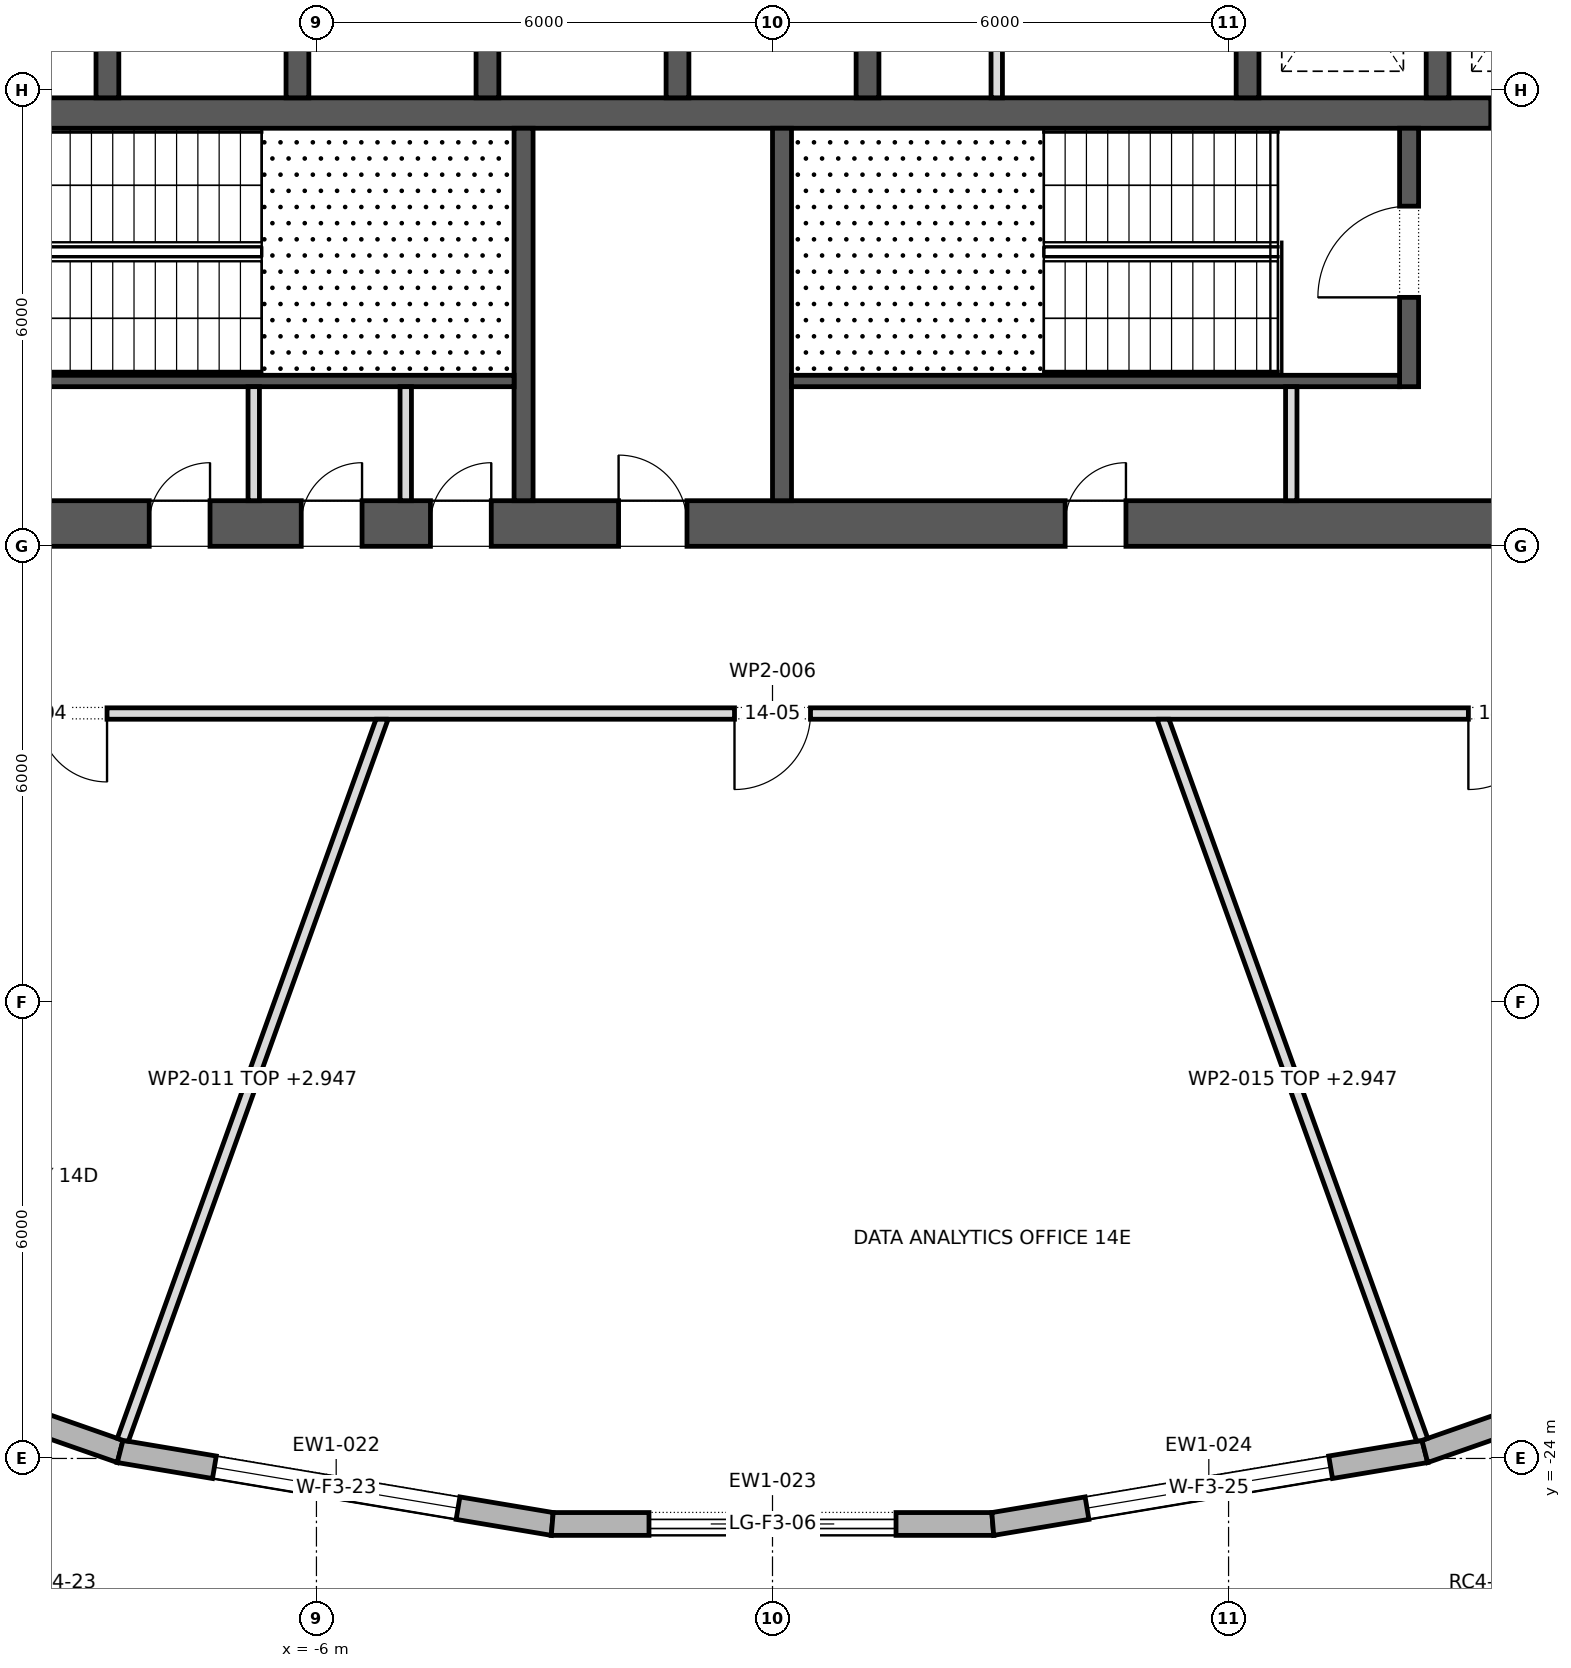
"""IFC4 building model, lengths in metres.
Left out: names, types, materials, properties, quantities, classifications, styles, units other than length and angle.
Written with IfcOpenShell. Run it as: python <this file> out.ifc"""

import sys

from ifc_helpers import new_model, si_unit, direction, frame, frame_2d, origin, place, context, subcontext, project, spatial, polyline, rectangle, outline, extrude, element, fill, save


model = new_model("IFC4")
c1 = context("Model", 3, precision=1e-05, world=origin(), true_north=direction((0.0, 1.0)))
c2 = subcontext(c1, "Body", "Model", "MODEL_VIEW")
j1 = project(units=[si_unit("LENGTHUNIT", "METRE"), si_unit("PLANEANGLEUNIT", "RADIAN")], contexts=[c1])
p1 = place(None, origin())
s1 = spatial("IfcSite", under=j1, at=p1, CompositionType="ELEMENT")
p2 = place(p1, origin())
s2 = spatial("IfcBuilding", under=s1, at=p2, CompositionType="ELEMENT")
p3 = place(p2, frame((0.0, 0.0, 202.9)))
s3 = spatial("IfcBuildingStorey", under=s2, at=p3, CompositionType="ELEMENT", Elevation=202.9)
p4 = place(p3, frame((-12.0, -11.7, 0.0), z_axis=(0.0, 0.0, 1.0), x_axis=(1.0, 0.0, 0.0)))
e1 = element("IfcWall", 1, at=p4, inside=s3, PredefinedType="SHEAR", context=c2, shape_type="SweptSolid", body=[
    extrude(rectangle(XDim=24.0, YDim=0.6, at=frame_2d((12.0, 0.0))), origin(), (0.0, 0.0, 1.0), 4.0),
])
p5 = place(p4, frame((9.975, 0.0, 0.0)))
e2 = element("IfcOpeningElement", 2, at=p5, cuts=e1, PredefinedType="OPENING", context=c2, shape_type="SweptSolid", body=[
    extrude(rectangle(XDim=0.9, YDim=2.1, at=frame_2d((0.45, 1.05))), frame((0.0, 0.312, 0.0), z_axis=(0.0, -1.0, 0.0), x_axis=(1.0, 0.0, 0.0)), (0.0, 0.0, 1.0), 0.624),
])
p6 = place(p4, frame((3.8, 0.0, 0.0)))
e3 = element("IfcOpeningElement", 3, at=p6, cuts=e1, PredefinedType="OPENING", context=c2, shape_type="SweptSolid", body=[
    extrude(rectangle(XDim=0.8, YDim=2.1, at=frame_2d((0.4, 1.05))), frame((0.0, 0.312, 0.0), z_axis=(0.0, -1.0, 0.0), x_axis=(1.0, 0.0, 0.0)), (0.0, 0.0, 1.0), 0.624),
])
p7 = place(p4, frame((5.8, 0.0, 0.0)))
e4 = element("IfcOpeningElement", 4, at=p7, cuts=e1, PredefinedType="OPENING", context=c2, shape_type="SweptSolid", body=[
    extrude(rectangle(XDim=0.8, YDim=2.1, at=frame_2d((0.4, 1.05))), frame((0.0, 0.312, 0.0), z_axis=(0.0, -1.0, 0.0), x_axis=(1.0, 0.0, 0.0)), (0.0, 0.0, 1.0), 0.624),
])
p8 = place(p4, frame((7.5, 0.0, 0.0)))
e5 = element("IfcOpeningElement", 5, at=p8, cuts=e1, PredefinedType="OPENING", context=c2, shape_type="SweptSolid", body=[
    extrude(rectangle(XDim=0.8, YDim=2.1, at=frame_2d((0.4, 1.05))), frame((0.0, 0.312, 0.0), z_axis=(0.0, -1.0, 0.0), x_axis=(1.0, 0.0, 0.0)), (0.0, 0.0, 1.0), 0.624),
])
p9 = place(p4, frame((15.85, 0.0, 0.0)))
e6 = element("IfcOpeningElement", 6, at=p9, cuts=e1, PredefinedType="OPENING", context=c2, shape_type="SweptSolid", body=[
    extrude(rectangle(XDim=0.8, YDim=2.1, at=frame_2d((0.4, 1.05))), frame((0.0, 0.312, 0.0), z_axis=(0.0, -1.0, 0.0), x_axis=(1.0, 0.0, 0.0)), (0.0, 0.0, 1.0), 0.624),
])
p10 = place(p3, frame((-11.4, -6.3, 0.0), z_axis=(0.0, 0.0, 1.0), x_axis=(1.0, 0.0, 0.0)))
e7 = element("IfcWall", 7, at=p10, inside=s3, PredefinedType="SHEAR", context=c2, shape_type="SweptSolid", body=[
    extrude(rectangle(XDim=22.8, YDim=0.4, at=frame_2d((11.4, 0.0))), origin(), (0.0, 0.0, 1.0), 4.0),
])
p11 = place(p10, frame((20.85, 0.0, 0.0)))
e8 = element("IfcOpeningElement", 8, at=p11, cuts=e7, PredefinedType="OPENING", context=c2, shape_type="SweptSolid", body=[
    extrude(rectangle(XDim=1.1, YDim=2.1, at=frame_2d((0.55, 1.05))), frame((0.0, 0.212, 0.0), z_axis=(0.0, -1.0, 0.0), x_axis=(1.0, 0.0, 0.0)), (0.0, 0.0, 1.0), 0.424),
])
for number, where, z_axis, x_axis in (
    (9, (-8.75, -6.1, 0.0), (0.0, 0.0, 1.0), (0.0, 1.0, 0.0)),
    (10, (-6.25, -6.1, 0.0), (0.0, 0.0, 1.0), (0.0, 1.0, 0.0)),
    (11, (-3.75, -6.1, 0.0), (0.0, 0.0, 1.0), (0.0, 1.0, 0.0)),
    (12, (-1.25, -6.1, 0.0), (0.0, 0.0, 1.0), (0.0, 1.0, 0.0)),
    (13, (1.25, -6.1, 0.0), (0.0, 0.0, 1.0), (0.0, 1.0, 0.0)),
    (14, (6.25, -6.1, 0.0), (0.0, 0.0, 1.0), (0.0, 1.0, 0.0)),
    (15, (8.75, -6.1, 0.0), (0.0, 0.0, 1.0), (0.0, 1.0, 0.0)),
):
    element("IfcWall", number, at=place(p3, frame(where, z_axis=z_axis, x_axis=x_axis)), inside=s3, PredefinedType="SHEAR", context=c2, shape_type="SweptSolid", body=[
        extrude(rectangle(XDim=2.9, YDim=0.3, at=frame_2d((1.45, 0.0))), origin(), (0.0, 0.0, 1.0), 4.0),
    ])
p12 = place(p3, frame((-13.938, -22.037, 0.0), z_axis=(0.0, 0.0, 1.0), x_axis=(0.944023272224, -0.329878858824, 0.0)))
e16 = element("IfcWall", 16, at=p12, inside=s3, PredefinedType="STANDARD", context=c2, shape_type="SweptSolid", body=[
    extrude(outline(polyline([(-0.013, -0.15), (5.686, -0.15), (5.661, 0.15), (0.013, 0.15), (-0.013, -0.15)])), origin(), (0.0, 0.0, 1.0), 3.7),
])
p13 = place(p12, frame((1.212, 0.0, 0.6)))
e17 = element("IfcOpeningElement", 17, at=p13, cuts=e16, PredefinedType="OPENING", context=c2, shape_type="SweptSolid", body=[
    extrude(rectangle(XDim=3.25, YDim=2.65, at=frame_2d((1.625, 1.325))), frame((0.0, 0.162, 0.0), z_axis=(0.0, -1.0, 0.0), x_axis=(1.0, 0.0, 0.0)), (0.0, 0.0, 1.0), 0.324),
])
p14 = place(p3, frame((-8.583, -23.908, 0.0), z_axis=(0.0, 0.0, 1.0), x_axis=(0.98622052717, -0.165436005116, 0.0)))
e18 = element("IfcWall", 18, at=p14, inside=s3, PredefinedType="STANDARD", context=c2, shape_type="SweptSolid", body=[
    extrude(outline(polyline([(-0.013, -0.15), (5.777, -0.15), (5.752, 0.15), (0.013, 0.15), (-0.013, -0.15)])), origin(), (0.0, 0.0, 1.0), 3.7),
])
p15 = place(p14, frame((1.257, 0.0, 0.6)))
e19 = element("IfcOpeningElement", 19, at=p15, cuts=e18, PredefinedType="OPENING", context=c2, shape_type="SweptSolid", body=[
    extrude(rectangle(XDim=3.25, YDim=2.65, at=frame_2d((1.625, 1.325))), frame((0.0, 0.162, 0.0), z_axis=(0.0, -1.0, 0.0), x_axis=(1.0, 0.0, 0.0)), (0.0, 0.0, 1.0), 0.324),
])
p16 = place(p3, frame((-2.898, -24.862, 0.0), z_axis=(0.0, 0.0, 1.0), x_axis=(1.0, 0.0, 0.0)))
e20 = element("IfcWall", 20, at=p16, inside=s3, PredefinedType="STANDARD", context=c2, shape_type="SweptSolid", body=[
    extrude(outline(polyline([(-0.012, -0.15), (5.808, -0.15), (5.783, 0.15), (0.012, 0.15), (-0.012, -0.15)])), origin(), (0.0, 0.0, 1.0), 3.7),
])
p17 = place(p16, frame((1.273, 0.0, 0.0)))
e21 = element("IfcOpeningElement", 21, at=p17, cuts=e20, PredefinedType="OPENING", context=c2, shape_type="SweptSolid", body=[
    extrude(rectangle(XDim=3.25, YDim=3.25, at=frame_2d((1.625, 1.625))), frame((0.0, 0.162, 0.0), z_axis=(0.0, -1.0, 0.0), x_axis=(1.0, 0.0, 0.0)), (0.0, 0.0, 1.0), 0.324),
])
p18 = place(p3, frame((2.898, -24.862, 0.0), z_axis=(0.0, 0.0, 1.0), x_axis=(0.98622052717, 0.165436005116, 0.0)))
e22 = element("IfcWall", 22, at=p18, inside=s3, PredefinedType="STANDARD", context=c2, shape_type="SweptSolid", body=[
    extrude(outline(polyline([(-0.012, -0.15), (5.777, -0.15), (5.751, 0.15), (0.012, 0.15), (-0.012, -0.15)])), origin(), (0.0, 0.0, 1.0), 3.7),
])
p19 = place(p18, frame((1.257, 0.0, 0.6)))
e23 = element("IfcOpeningElement", 23, at=p19, cuts=e22, PredefinedType="OPENING", context=c2, shape_type="SweptSolid", body=[
    extrude(rectangle(XDim=3.25, YDim=2.65, at=frame_2d((1.625, 1.325))), frame((0.0, 0.162, 0.0), z_axis=(0.0, -1.0, 0.0), x_axis=(1.0, 0.0, 0.0)), (0.0, 0.0, 1.0), 0.324),
])
p20 = place(p3, frame((8.583, -23.908, 0.0), z_axis=(0.0, 0.0, 1.0), x_axis=(0.944023272224, 0.329878858824, 0.0)))
e24 = element("IfcWall", 24, at=p20, inside=s3, PredefinedType="STANDARD", context=c2, shape_type="SweptSolid", body=[
    extrude(outline(polyline([(-0.013, -0.15), (5.687, -0.15), (5.66, 0.15), (0.013, 0.15), (-0.013, -0.15)])), origin(), (0.0, 0.0, 1.0), 3.7),
])
p21 = place(p20, frame((1.212, 0.0, 0.6)))
e25 = element("IfcOpeningElement", 25, at=p21, cuts=e24, PredefinedType="OPENING", context=c2, shape_type="SweptSolid", body=[
    extrude(rectangle(XDim=3.25, YDim=2.65, at=frame_2d((1.625, 1.325))), frame((0.0, 0.162, 0.0), z_axis=(0.0, -1.0, 0.0), x_axis=(1.0, 0.0, 0.0)), (0.0, 0.0, 1.0), 0.324),
])
for number, where, z_axis, x_axis in (
    (26, (-3.275, -11.4, 0.0), (0.0, 0.0, 1.0), (0.0, 1.0, 0.0)),
    (27, (0.125, -11.4, 0.0), (0.0, 0.0, 1.0), (0.0, 1.0, 0.0)),
):
    element("IfcWall", number, at=place(p3, frame(where, z_axis=z_axis, x_axis=x_axis)), inside=s3, PredefinedType="SHEAR", context=c2, shape_type="SweptSolid", body=[
        extrude(rectangle(XDim=4.9, YDim=0.25, at=frame_2d((2.45, 0.0))), origin(), (0.0, 0.0, 1.0), 3.7),
    ])
p22 = place(p3, frame((8.375, -9.9, 0.0), z_axis=(0.0, 0.0, 1.0), x_axis=(0.0, 1.0, 0.0)))
e28 = element("IfcWall", 28, at=p22, inside=s3, PredefinedType="SHEAR", context=c2, shape_type="SweptSolid", body=[
    extrude(rectangle(XDim=3.4, YDim=0.25, at=frame_2d((1.7, 0.0))), origin(), (0.0, 0.0, 1.0), 3.7),
])
p23 = place(p22, frame((1.175, 0.0, 0.0)))
e29 = element("IfcOpeningElement", 29, at=p23, cuts=e28, PredefinedType="OPENING", context=c2, shape_type="SweptSolid", body=[
    extrude(rectangle(XDim=1.2, YDim=2.1, at=frame_2d((0.6, 1.05))), frame((0.0, 0.137, 0.0), z_axis=(0.0, -1.0, 0.0), x_axis=(1.0, 0.0, 0.0)), (0.0, 0.0, 1.0), 0.274),
])
for number, where, z_axis, x_axis in (
    (30, (-11.4, -9.825, 0.0), (0.0, 0.0, 1.0), (1.0, 0.0, 0.0)),
    (31, (0.25, -9.825, 0.0), (0.0, 0.0, 1.0), (1.0, 0.0, 0.0)),
):
    element("IfcWall", number, at=place(p3, frame(where, z_axis=z_axis, x_axis=x_axis)), inside=s3, PredefinedType="SHEAR", context=c2, shape_type="SweptSolid", body=[
        extrude(rectangle(XDim=8.0, YDim=0.15, at=frame_2d((4.0, 0.0))), origin(), (0.0, 0.0, 1.0), 3.7),
    ])
for number, where, z_axis, x_axis in (
    (32, (-6.825, -11.4, 0.0), (0.0, 0.0, 1.0), (0.0, 1.0, 0.0)),
    (33, (-4.825, -11.4, 0.0), (0.0, 0.0, 1.0), (0.0, 1.0, 0.0)),
    (34, (6.825, -11.4, 0.0), (0.0, 0.0, 1.0), (0.0, 1.0, 0.0)),
):
    element("IfcWall", number, at=place(p3, frame(where, z_axis=z_axis, x_axis=x_axis)), inside=s3, PredefinedType="PARTITIONING", context=c2, shape_type="SweptSolid", body=[
        extrude(rectangle(XDim=1.5, YDim=0.15, at=frame_2d((0.75, 0.0))), origin(), (0.0, 0.0, 1.0), 3.7),
    ])
p24 = place(p3, frame((2.95, -6.1, 0.0), z_axis=(0.0, 0.0, 1.0), x_axis=(0.0, 1.0, 0.0)))
e35 = element("IfcWall", 35, at=p24, inside=s3, PredefinedType="PARTITIONING", context=c2, shape_type="SweptSolid", body=[
    extrude(rectangle(XDim=2.9, YDim=0.15, at=frame_2d((1.45, 0.0))), origin(), (0.0, 0.0, 1.0), 3.7),
])
p25 = place(p3, frame((-14.275, -14.2, 0.0), z_axis=(0.0, 0.0, 1.0), x_axis=(1.0, 0.0, 0.0)))
e36 = element("IfcWall", 36, at=p25, inside=s3, PredefinedType="PARTITIONING", context=c2, shape_type="SweptSolid", body=[
    extrude(outline(polyline([(28.55, -0.075), (28.55, -0.075), (28.4, 0.075), (26.517, 0.075), (24.633, 0.075), (22.75, 0.075), (20.866, 0.075), (18.983, 0.075), (17.1, 0.075), (15.217, 0.075), (13.333, 0.075), (11.45, 0.075), (9.567, 0.075), (7.683, 0.075), (5.8, 0.075), (3.917, 0.075), (2.033, 0.075), (0.15, 0.075), (0.0, -0.075), (1.903, -0.075), (3.807, -0.075), (5.71, -0.075), (7.613, -0.075), (9.517, -0.075), (11.42, -0.075), (13.323, -0.075), (15.227, -0.075), (17.13, -0.075), (19.033, -0.075), (20.937, -0.075), (22.84, -0.075), (24.743, -0.075), (26.646, -0.075), (28.55, -0.075)])), origin(), (0.0, 0.0, 1.0), 3.7),
])
p26 = place(p25, frame((3.72, 0.0, 0.0)))
e37 = element("IfcOpeningElement", 37, at=p26, cuts=e36, PredefinedType="OPENING", context=c2, shape_type="SweptSolid", body=[
    extrude(rectangle(XDim=1.8, YDim=2.1, at=frame_2d((0.9, 1.05))), frame((0.0, 0.087, 0.0), z_axis=(0.0, -1.0, 0.0), x_axis=(1.0, 0.0, 0.0)), (0.0, 0.0, 1.0), 0.174),
])
p27 = place(p25, frame((13.775, 0.0, 0.0)))
e38 = element("IfcOpeningElement", 38, at=p27, cuts=e36, PredefinedType="OPENING", context=c2, shape_type="SweptSolid", body=[
    extrude(rectangle(XDim=1.0, YDim=2.1, at=frame_2d((0.5, 1.05))), frame((0.0, 0.087, 0.0), z_axis=(0.0, -1.0, 0.0), x_axis=(1.0, 0.0, 0.0)), (0.0, 0.0, 1.0), 0.174),
])
p28 = place(p25, frame((23.43, 0.0, 0.0)))
e39 = element("IfcOpeningElement", 39, at=p28, cuts=e36, PredefinedType="OPENING", context=c2, shape_type="SweptSolid", body=[
    extrude(rectangle(XDim=1.0, YDim=2.1, at=frame_2d((0.5, 1.05))), frame((0.0, 0.087, 0.0), z_axis=(0.0, -1.0, 0.0), x_axis=(1.0, 0.0, 0.0)), (0.0, 0.0, 1.0), 0.174),
])
p29 = place(p3, frame((-5.128, -14.25, 0.0), z_axis=(0.0, 0.0, 1.0), x_axis=(-0.338529589418, -0.940955746615, 0.0)))
e40 = element("IfcWall", 40, at=p29, inside=s3, PredefinedType="PARTITIONING", context=c2, shape_type="SweptSolid", body=[
    extrude(outline(polyline([(10.108, -0.075), (10.108, -0.072), (10.107, 0.005), (10.095, 0.075), (8.412, 0.075), (6.73, 0.075), (5.047, 0.075), (3.365, 0.075), (1.682, 0.075), (0.0, 0.075), (0.0, 0.074), (0.053, -0.075), (1.729, -0.075), (3.405, -0.075), (5.081, -0.075), (6.757, -0.075), (8.432, -0.075), (10.108, -0.075)])), origin(), (0.0, 0.0, 1.0), 2.947),
])
p30 = place(p3, frame((5.128, -14.25, 0.0), z_axis=(0.0, 0.0, 1.0), x_axis=(0.338529589418, -0.940955746615, 0.0)))
e41 = element("IfcWall", 41, at=p30, inside=s3, PredefinedType="PARTITIONING", context=c2, shape_type="SweptSolid", body=[
    extrude(outline(polyline([(0.0, -0.075), (1.682, -0.075), (3.365, -0.075), (5.047, -0.075), (6.73, -0.075), (8.412, -0.075), (10.095, -0.075), (10.107, -0.005), (10.108, 0.072), (10.108, 0.075), (8.432, 0.075), (6.757, 0.075), (5.081, 0.075), (3.405, 0.075), (1.729, 0.075), (0.053, 0.075), (0.0, -0.074), (0.0, -0.075)])), origin(), (0.0, 0.0, 1.0), 2.947),
])
p31 = place(p15, origin())
e42 = element("IfcWindow", 42, at=p31, inside=s3, PartitioningType="TRIPLE_PANEL_VERTICAL", PredefinedType="WINDOW", context=c2, shape_type="SweptSolid", body=[
    extrude(rectangle(XDim=3.25, YDim=2.65, at=frame_2d((1.625, 1.325))), frame((0.0, 0.03, 0.0), z_axis=(0.0, -1.0, 0.0), x_axis=(1.0, 0.0, 0.0)), (0.0, 0.0, 1.0), 0.06),
])
fill(e19, e42)
p32 = place(p17, origin())
e43 = element("IfcDoor", 43, at=p32, inside=s3, OperationType="DOUBLE_DOOR_SLIDING", PredefinedType="DOOR", context=c2, shape_type="SweptSolid", body=[
    extrude(rectangle(XDim=3.25, YDim=3.25, at=frame_2d((1.625, 1.625))), frame((0.0, 0.025, 0.0), z_axis=(0.0, -1.0, 0.0), x_axis=(1.0, 0.0, 0.0)), (0.0, 0.0, 1.0), 0.05),
])
fill(e21, e43)
p33 = place(p19, origin())
e44 = element("IfcWindow", 44, at=p33, inside=s3, PartitioningType="TRIPLE_PANEL_VERTICAL", PredefinedType="WINDOW", context=c2, shape_type="SweptSolid", body=[
    extrude(rectangle(XDim=3.25, YDim=2.65, at=frame_2d((1.625, 1.325))), frame((0.0, 0.03, 0.0), z_axis=(0.0, -1.0, 0.0), x_axis=(1.0, 0.0, 0.0)), (0.0, 0.0, 1.0), 0.06),
])
fill(e23, e44)
p34 = place(p11, origin())
e45 = element("IfcDoor", 45, at=p34, inside=s3, OperationType="SLIDING_TO_LEFT", PredefinedType="DOOR", context=c2, shape_type="SweptSolid", body=[
    extrude(rectangle(XDim=1.1, YDim=2.1, at=frame_2d((0.55, 1.05))), frame((0.0, 0.025, 0.0), z_axis=(0.0, -1.0, 0.0), x_axis=(1.0, 0.0, 0.0)), (0.0, 0.0, 1.0), 0.05),
])
fill(e8, e45)
p35 = place(p23, origin())
e46 = element("IfcDoor", 46, at=p35, inside=s3, OperationType="SINGLE_SWING_RIGHT", PredefinedType="DOOR", context=c2, shape_type="SweptSolid", body=[
    extrude(rectangle(XDim=1.2, YDim=2.1, at=frame_2d((0.6, 1.05))), frame((0.0, 0.025, 0.0), z_axis=(0.0, -1.0, 0.0), x_axis=(1.0, 0.0, 0.0)), (0.0, 0.0, 1.0), 0.05),
])
fill(e29, e46)
p36 = place(p5, origin())
e47 = element("IfcDoor", 47, at=p36, inside=s3, OperationType="SINGLE_SWING_RIGHT", PredefinedType="DOOR", context=c2, shape_type="SweptSolid", body=[
    extrude(rectangle(XDim=0.9, YDim=2.1, at=frame_2d((0.45, 1.05))), frame((0.0, 0.025, 0.0), z_axis=(0.0, -1.0, 0.0), x_axis=(1.0, 0.0, 0.0)), (0.0, 0.0, 1.0), 0.05),
])
fill(e2, e47)
p37 = place(p6, origin())
e48 = element("IfcDoor", 48, at=p37, inside=s3, OperationType="SINGLE_SWING_LEFT", PredefinedType="DOOR", context=c2, shape_type="SweptSolid", body=[
    extrude(rectangle(XDim=0.8, YDim=2.1, at=frame_2d((0.4, 1.05))), frame((0.0, 0.025, 0.0), z_axis=(0.0, -1.0, 0.0), x_axis=(1.0, 0.0, 0.0)), (0.0, 0.0, 1.0), 0.05),
])
fill(e3, e48)
p38 = place(p7, origin())
e49 = element("IfcDoor", 49, at=p38, inside=s3, OperationType="SINGLE_SWING_LEFT", PredefinedType="DOOR", context=c2, shape_type="SweptSolid", body=[
    extrude(rectangle(XDim=0.8, YDim=2.1, at=frame_2d((0.4, 1.05))), frame((0.0, 0.025, 0.0), z_axis=(0.0, -1.0, 0.0), x_axis=(1.0, 0.0, 0.0)), (0.0, 0.0, 1.0), 0.05),
])
fill(e4, e49)
p39 = place(p8, origin())
e50 = element("IfcDoor", 50, at=p39, inside=s3, OperationType="SINGLE_SWING_LEFT", PredefinedType="DOOR", context=c2, shape_type="SweptSolid", body=[
    extrude(rectangle(XDim=0.8, YDim=2.1, at=frame_2d((0.4, 1.05))), frame((0.0, 0.025, 0.0), z_axis=(0.0, -1.0, 0.0), x_axis=(1.0, 0.0, 0.0)), (0.0, 0.0, 1.0), 0.05),
])
fill(e5, e50)
p40 = place(p9, origin())
e51 = element("IfcDoor", 51, at=p40, inside=s3, OperationType="SINGLE_SWING_LEFT", PredefinedType="DOOR", context=c2, shape_type="SweptSolid", body=[
    extrude(rectangle(XDim=0.8, YDim=2.1, at=frame_2d((0.4, 1.05))), frame((0.0, 0.025, 0.0), z_axis=(0.0, -1.0, 0.0), x_axis=(1.0, 0.0, 0.0)), (0.0, 0.0, 1.0), 0.05),
])
fill(e6, e51)
p41 = place(p26, frame((1.8, 0.0, 0.0), z_axis=(0.0, 0.0, 1.0), x_axis=(-1.0, 0.0, 0.0)))
e52 = element("IfcDoor", 52, at=p41, inside=s3, OperationType="DOUBLE_DOOR_SINGLE_SWING", PredefinedType="DOOR", context=c2, shape_type="SweptSolid", body=[
    extrude(rectangle(XDim=1.8, YDim=2.1, at=frame_2d((0.9, 1.05))), frame((0.0, 0.025, 0.0), z_axis=(0.0, -1.0, 0.0), x_axis=(1.0, 0.0, 0.0)), (0.0, 0.0, 1.0), 0.05),
])
fill(e37, e52)
p42 = place(p27, frame((1.0, 0.0, 0.0), z_axis=(0.0, 0.0, 1.0), x_axis=(-1.0, 0.0, 0.0)))
e53 = element("IfcDoor", 53, at=p42, inside=s3, OperationType="SINGLE_SWING_LEFT", PredefinedType="DOOR", context=c2, shape_type="SweptSolid", body=[
    extrude(rectangle(XDim=1.0, YDim=2.1, at=frame_2d((0.5, 1.05))), frame((0.0, 0.025, 0.0), z_axis=(0.0, -1.0, 0.0), x_axis=(1.0, 0.0, 0.0)), (0.0, 0.0, 1.0), 0.05),
])
fill(e38, e53)
p43 = place(p28, frame((1.0, 0.0, 0.0), z_axis=(0.0, 0.0, 1.0), x_axis=(-1.0, 0.0, 0.0)))
e54 = element("IfcDoor", 54, at=p43, inside=s3, OperationType="SINGLE_SWING_LEFT", PredefinedType="DOOR", context=c2, shape_type="SweptSolid", body=[
    extrude(rectangle(XDim=1.0, YDim=2.1, at=frame_2d((0.5, 1.05))), frame((0.0, 0.025, 0.0), z_axis=(0.0, -1.0, 0.0), x_axis=(1.0, 0.0, 0.0)), (0.0, 0.0, 1.0), 0.05),
])
fill(e39, e54)
save(model, sys.argv[1])
